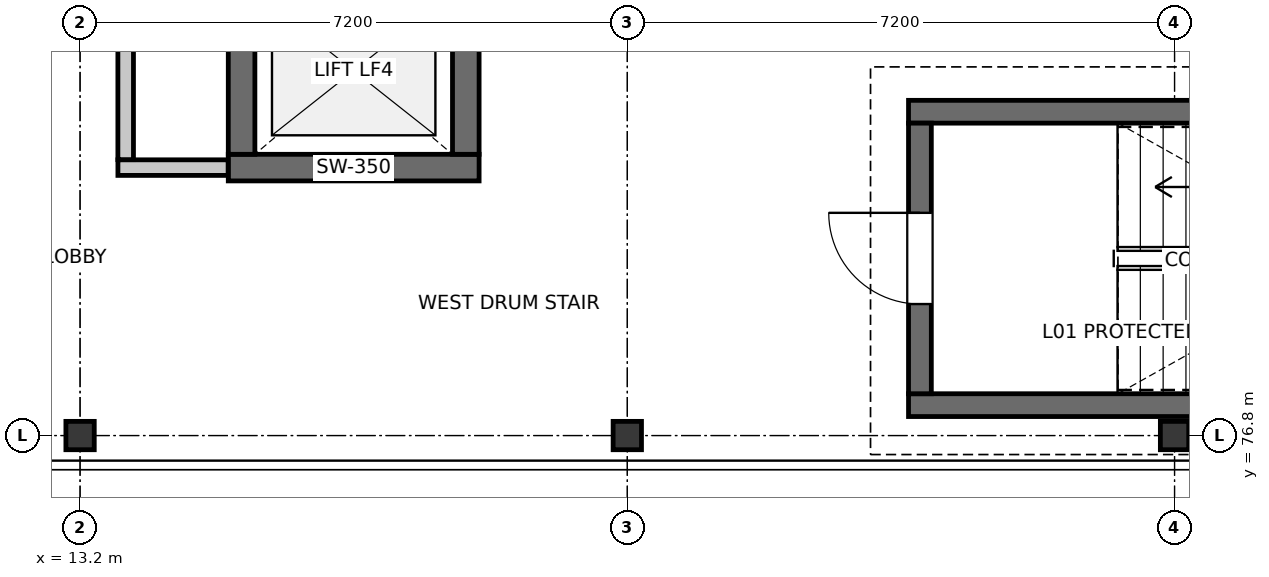
"""IFC4 building model, lengths in metres.
Left out: names, types, materials, properties, quantities, classifications, styles, units other than length and angle.
Written with IfcOpenShell. Run it as: python <this file> out.ifc"""

import sys

from ifc_helpers import new_model, si_unit, direction, frame, frame_2d, origin, origin_2d, place, context, subcontext, project, spatial, rectangle, i_section, extrude, element, fill, save


model = new_model("IFC4")
c1 = context("Model", 3, precision=1e-05, world=origin(), true_north=direction((0.0, 1.0)))
c2 = subcontext(c1, "Body", "Model", "MODEL_VIEW")
j1 = project(units=[si_unit("LENGTHUNIT", "METRE"), si_unit("PLANEANGLEUNIT", "RADIAN")], contexts=[c1])
p1 = place(None, origin())
s1 = spatial("IfcSite", under=j1, at=p1, CompositionType="ELEMENT")
p2 = place(p1, origin())
s2 = spatial("IfcBuilding", under=s1, at=p2, CompositionType="ELEMENT")
p3 = place(p2, frame((0.0, 0.0, 5.4)))
s3 = spatial("IfcBuildingStorey", under=s2, at=p3, CompositionType="ELEMENT", Elevation=5.4)
for number, where, z_axis, x_axis in (
    (1, (13.2, 76.8, 0.0), (0.0, 0.0, 1.0), (1.0, 0.0, 0.0)),
    (2, (20.4, 76.8, 0.0), (0.0, 0.0, 1.0), (1.0, 0.0, 0.0)),
    (3, (27.6, 76.8, 0.0), (0.0, 0.0, 1.0), (1.0, 0.0, 0.0)),
):
    element("IfcColumn", number, at=place(p3, frame(where, z_axis=z_axis, x_axis=x_axis)), inside=s3, PredefinedType="COLUMN", context=c2, shape_type="SweptSolid", body=[
        extrude(i_section(OverallWidth=0.373, OverallDepth=0.373, WebThickness=0.016, FlangeThickness=0.026, FilletRadius=0.015, at=origin_2d()), origin(), (0.0, 0.0, 1.0), 3.9),
    ])
for number, where, z_axis, x_axis in (
    (4, (33.5, 77.2, 0.0), (0.0, 0.0, 1.0), (-1.0, 0.0, 0.0)),
    (5, (24.1, 81.06, 0.0), (0.0, 0.0, 1.0), (1.0, 0.0, 0.0)),
):
    element("IfcWall", number, at=place(p3, frame(where, z_axis=z_axis, x_axis=x_axis)), inside=s3, PredefinedType="SOLIDWALL", context=c2, shape_type="SweptSolid", body=[
        extrude(rectangle(XDim=9.4, YDim=0.3, at=frame_2d((4.7, 0.0))), origin(), (0.0, 0.0, 1.0), 3.65),
    ])
p4 = place(p3, frame((24.25, 77.35, 0.0), z_axis=(0.0, 0.0, 1.0), x_axis=(0.0, 1.0, 0.0)))
e6 = element("IfcWall", 6, at=p4, inside=s3, PredefinedType="SOLIDWALL", context=c2, shape_type="SweptSolid", body=[
    extrude(rectangle(XDim=3.56, YDim=0.3, at=frame_2d((1.78, 0.0))), origin(), (0.0, 0.0, 1.0), 3.65),
])
p5 = place(p4, frame((1.18, 0.0, 0.0)))
e7 = element("IfcOpeningElement", 7, at=p5, cuts=e6, PredefinedType="OPENING", context=c2, shape_type="SweptSolid", body=[
    extrude(rectangle(XDim=1.2, YDim=2.2, at=frame_2d((0.6, 1.1))), frame((0.0, 0.16, 0.0), z_axis=(0.0, -1.0, 0.0), x_axis=(1.0, 0.0, 0.0)), (0.0, 0.0, 1.0), 0.32),
])
p6 = place(p3, frame((18.45, 80.325, 0.0), z_axis=(0.0, 0.0, 1.0), x_axis=(-1.0, 0.0, 0.0)))
e8 = element("IfcWall", 8, at=p6, inside=s3, PredefinedType="SHEAR", context=c2, shape_type="SweptSolid", body=[
    extrude(rectangle(XDim=3.3, YDim=0.35, at=frame_2d((1.65, 0.0))), origin(), (0.0, 0.0, 1.0), 3.65),
])
for number, where, z_axis, x_axis in (
    (9, (15.325, 80.5, 0.0), (0.0, 0.0, 1.0), (0.0, 1.0, 0.0)),
    (10, (18.275, 82.7, 0.0), (0.0, 0.0, 1.0), (0.0, -1.0, 0.0)),
):
    element("IfcWall", number, at=place(p3, frame(where, z_axis=z_axis, x_axis=x_axis)), inside=s3, PredefinedType="SHEAR", context=c2, shape_type="SweptSolid", body=[
        extrude(rectangle(XDim=2.2, YDim=0.35, at=frame_2d((1.1, 0.0))), origin(), (0.0, 0.0, 1.0), 3.65),
    ])
p7 = place(p3, frame((15.148, 80.325, 0.0), z_axis=(0.0, 0.0, 1.0), x_axis=(-1.0, 0.0, 0.0)))
e11 = element("IfcWall", 11, at=p7, inside=s3, PredefinedType="PARTITIONING", context=c2, shape_type="SweptSolid", body=[
    extrude(rectangle(XDim=1.45, YDim=0.205, at=frame_2d((0.725, 0.0))), origin(), (0.0, 0.0, 1.0), 3.018),
])
p8 = place(p3, frame((13.8, 80.43, 0.0), z_axis=(0.0, 0.0, 1.0), x_axis=(0.0, 1.0, 0.0)))
e12 = element("IfcWall", 12, at=p8, inside=s3, PredefinedType="PARTITIONING", context=c2, shape_type="SweptSolid", body=[
    extrude(rectangle(XDim=4.516, YDim=0.205, at=frame_2d((2.258, 0.0))), origin(), (0.0, 0.0, 1.0), 3.018),
])
p9 = place(p8, frame((1.788, 0.0, 0.0)))
e13 = element("IfcOpeningElement", 13, at=p9, cuts=e12, PredefinedType="OPENING", context=c2, shape_type="SweptSolid", body=[
    extrude(rectangle(XDim=0.94, YDim=2.1, at=frame_2d((0.47, 1.05))), frame((0.0, 0.113, 0.0), z_axis=(0.0, -1.0, 0.0), x_axis=(1.0, 0.0, 0.0)), (0.0, 0.0, 1.0), 0.225),
])
p10 = place(p5, origin())
e14 = element("IfcDoor", 14, at=p10, inside=s3, OperationType="SINGLE_SWING_RIGHT", PredefinedType="DOOR", context=c2, shape_type="SweptSolid", body=[
    extrude(rectangle(XDim=1.2, YDim=2.2, at=frame_2d((0.6, 1.1))), frame((0.0, 0.025, 0.0), z_axis=(0.0, -1.0, 0.0), x_axis=(1.0, 0.0, 0.0)), (0.0, 0.0, 1.0), 0.05),
])
fill(e7, e14)
save(model, sys.argv[1])
